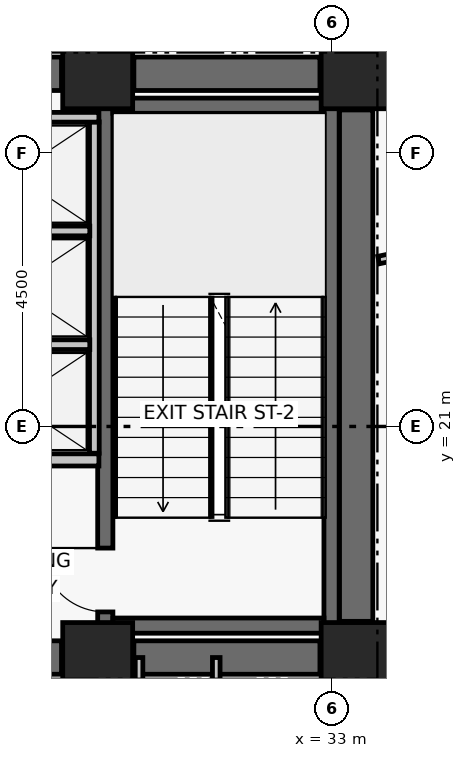
"""IFC4 building model, lengths in metres.
Left out: names, types, materials, properties, quantities, classifications, styles, units other than length and angle.
Written with IfcOpenShell. Run it as: python <this file> out.ifc"""

import sys

from ifc_helpers import new_model, si_unit, direction, frame, frame_2d, origin, origin_2d, place, context, subcontext, project, spatial, rectangle, extrude, element, fill, save


model = new_model("IFC4")
c1 = context("Model", 3, precision=1e-05, world=origin(), true_north=direction((0.0, 1.0)))
c2 = subcontext(c1, "Body", "Model", "MODEL_VIEW")
j1 = project(units=[si_unit("LENGTHUNIT", "METRE"), si_unit("PLANEANGLEUNIT", "RADIAN")], contexts=[c1])
p1 = place(None, origin())
s1 = spatial("IfcSite", under=j1, at=p1, CompositionType="ELEMENT")
p2 = place(p1, origin())
s2 = spatial("IfcBuilding", under=s1, at=p2, CompositionType="ELEMENT")
p3 = place(p2, frame((0.0, 0.0, 122.58)))
s3 = spatial("IfcBuildingStorey", under=s2, at=p3, CompositionType="ELEMENT", Elevation=122.58)
for number, where, z_axis, x_axis in (
    (1, (29.15, 17.2, 0.0), (0.0, 0.0, 1.0), (1.0, 0.0, 0.0)),
    (2, (33.4, 17.2, 0.0), (0.0, 0.0, 1.0), (1.0, 0.0, 0.0)),
    (3, (29.15, 26.8, 0.0), (0.0, 0.0, 1.0), (1.0, 0.0, 0.0)),
    (4, (33.4, 26.8, 0.0), (0.0, 0.0, 1.0), (1.0, 0.0, 0.0)),
):
    element("IfcColumn", number, at=place(p3, frame(where, z_axis=z_axis, x_axis=x_axis)), inside=s3, PredefinedType="COLUMN", context=c2, shape_type="SweptSolid", body=[
        extrude(rectangle(XDim=1.15, YDim=1.15, at=origin_2d()), origin(), (0.0, 0.0, 1.0), 3.72),
    ])
p4 = place(p3, frame((26.85, 17.2, 0.0), z_axis=(0.0, 0.0, 1.0), x_axis=(1.0, 0.0, 0.0)))
e5 = element("IfcWall", 5, at=p4, inside=s3, PredefinedType="SHEAR", context=c2, shape_type="SweptSolid", body=[
    extrude(rectangle(XDim=1.705, YDim=0.55, at=frame_2d((0.853, 0.0))), origin(), (0.0, 0.0, 1.0), 3.47),
])
p5 = place(p3, frame((29.745, 17.2, 0.0), z_axis=(0.0, 0.0, 1.0), x_axis=(1.0, 0.0, 0.0)))
e6 = element("IfcWall", 6, at=p5, inside=s3, PredefinedType="SHEAR", context=c2, shape_type="SweptSolid", body=[
    extrude(rectangle(XDim=3.06, YDim=0.55, at=frame_2d((1.53, 0.0))), origin(), (0.0, 0.0, 1.0), 3.47),
])
p6 = place(p3, frame((26.85, 26.8, 0.0), z_axis=(0.0, 0.0, 1.0), x_axis=(1.0, 0.0, 0.0)))
e7 = element("IfcWall", 7, at=p6, inside=s3, PredefinedType="SHEAR", context=c2, shape_type="SweptSolid", body=[
    extrude(rectangle(XDim=1.705, YDim=0.55, at=frame_2d((0.853, 0.0))), origin(), (0.0, 0.0, 1.0), 3.47),
])
p7 = place(p3, frame((29.745, 26.8, 0.0), z_axis=(0.0, 0.0, 1.0), x_axis=(1.0, 0.0, 0.0)))
e8 = element("IfcWall", 8, at=p7, inside=s3, PredefinedType="SHEAR", context=c2, shape_type="SweptSolid", body=[
    extrude(rectangle(XDim=3.06, YDim=0.55, at=frame_2d((1.53, 0.0))), origin(), (0.0, 0.0, 1.0), 3.47),
])
p8 = place(p3, frame((33.4, 17.795, 0.0), z_axis=(0.0, 0.0, 1.0), x_axis=(0.0, 1.0, 0.0)))
e9 = element("IfcWall", 9, at=p8, inside=s3, PredefinedType="SHEAR", context=c2, shape_type="SweptSolid", body=[
    extrude(rectangle(XDim=8.41, YDim=0.55, at=frame_2d((4.205, 0.0))), origin(), (0.0, 0.0, 1.0), 3.47),
])
p9 = place(p3, frame((29.275, 17.6, 0.0), z_axis=(0.0, 0.0, 1.0), x_axis=(0.0, 1.0, 0.0)))
e10 = element("IfcWall", 10, at=p9, inside=s3, PredefinedType="SHEAR", context=c2, shape_type="SweptSolid", body=[
    extrude(rectangle(XDim=8.8, YDim=0.25, at=frame_2d((4.4, 0.0))), origin(), (0.0, 0.0, 1.0), 3.47),
])
p10 = place(p9, frame((0.35, 0.0, 0.0)))
e11 = element("IfcOpeningElement", 11, at=p10, cuts=e10, PredefinedType="OPENING", context=c2, shape_type="SweptSolid", body=[
    extrude(rectangle(XDim=1.05, YDim=2.08, at=frame_2d((0.525, 1.04))), frame((0.0, 0.135, 0.0), z_axis=(0.0, -1.0, 0.0), x_axis=(1.0, 0.0, 0.0)), (0.0, 0.0, 1.0), 0.27),
])
p11 = place(p3, frame((32.996, 17.6, 0.0), z_axis=(0.0, 0.0, 1.0), x_axis=(0.0, 1.0, 0.0)))
e12 = element("IfcWall", 12, at=p11, inside=s3, PredefinedType="SHEAR", context=c2, shape_type="SweptSolid", body=[
    extrude(rectangle(XDim=8.8, YDim=0.25, at=frame_2d((4.4, 0.0))), origin(), (0.0, 0.0, 1.0), 3.47),
])
for number, where, z_axis, x_axis in (
    (13, (29.4, 17.725, 0.0), (0.0, 0.0, 1.0), (1.0, 0.0, 0.0)),
    (14, (29.4, 26.275, 0.0), (0.0, 0.0, 1.0), (1.0, 0.0, 0.0)),
):
    element("IfcWall", number, at=place(p3, frame(where, z_axis=z_axis, x_axis=x_axis)), inside=s3, PredefinedType="SHEAR", context=c2, shape_type="SweptSolid", body=[
        extrude(rectangle(XDim=3.471, YDim=0.25, at=frame_2d((1.736, 0.0))), origin(), (0.0, 0.0, 1.0), 3.47),
    ])
p12 = place(p3, frame((26.37, 20.45, 0.0), z_axis=(0.0, 0.0, 1.0), x_axis=(1.0, 0.0, 0.0)))
e15 = element("IfcWall", 15, at=p12, inside=s3, PredefinedType="PARTITIONING", context=c2, shape_type="SweptSolid", body=[
    extrude(rectangle(XDim=2.8, YDim=0.2, at=frame_2d((1.4, 0.0))), origin(), (0.0, 0.0, 1.0), 3.47),
])
p13 = place(p12, frame((0.78, 0.0, 0.0)))
e16 = element("IfcOpeningElement", 16, at=p13, cuts=e15, PredefinedType="OPENING", context=c2, shape_type="SweptSolid", body=[
    extrude(rectangle(XDim=1.1, YDim=2.08, at=frame_2d((0.55, 1.04))), frame((0.0, 0.11, 0.0), z_axis=(0.0, -1.0, 0.0), x_axis=(1.0, 0.0, 0.0)), (0.0, 0.0, 1.0), 0.22),
])
p14 = place(p3, frame((29.095, 20.56, 0.0), z_axis=(0.0, 0.0, 1.0), x_axis=(0.0, 1.0, 0.0)))
e17 = element("IfcWall", 17, at=p14, inside=s3, PredefinedType="PARTITIONING", context=c2, shape_type="SweptSolid", body=[
    extrude(rectangle(XDim=5.45, YDim=0.16, at=frame_2d((2.725, 0.0))), origin(), (0.0, 0.0, 1.0), 3.47),
])
p15 = place(p3, frame((26.37, 22.345, 0.0), z_axis=(0.0, 0.0, 1.0), x_axis=(1.0, 0.0, 0.0)))
e18 = element("IfcWall", 18, at=p15, inside=s3, PredefinedType="PARTITIONING", context=c2, shape_type="SweptSolid", body=[
    extrude(rectangle(XDim=2.65, YDim=0.16, at=frame_2d((1.325, 0.0))), origin(), (0.0, 0.0, 1.0), 3.47),
])
p16 = place(p3, frame((26.53, 24.215, 0.0), z_axis=(0.0, 0.0, 1.0), x_axis=(1.0, 0.0, 0.0)))
e19 = element("IfcWall", 19, at=p16, inside=s3, PredefinedType="PARTITIONING", context=c2, shape_type="SweptSolid", body=[
    extrude(rectangle(XDim=2.49, YDim=0.16, at=frame_2d((1.245, 0.0))), origin(), (0.0, 0.0, 1.0), 3.47),
])
p17 = place(p3, frame((26.34, 26.085, 0.0), z_axis=(0.0, 0.0, 1.0), x_axis=(1.0, 0.0, 0.0)))
e20 = element("IfcWall", 20, at=p17, inside=s3, PredefinedType="PARTITIONING", context=c2, shape_type="SweptSolid", body=[
    extrude(rectangle(XDim=2.83, YDim=0.16, at=frame_2d((1.415, 0.0))), origin(), (0.0, 0.0, 1.0), 3.47),
])
for number, where, z_axis, x_axis in (
    (21, (29.83, 14.95, 0.0), (0.0, 0.0, 1.0), (0.0, 1.0, 0.0)),
    (22, (31.1, 14.95, 0.0), (0.0, 0.0, 1.0), (0.0, 1.0, 0.0)),
):
    element("IfcWall", number, at=place(p3, frame(where, z_axis=z_axis, x_axis=x_axis)), inside=s3, PredefinedType="PARTITIONING", context=c2, shape_type="SweptSolid", body=[
        extrude(rectangle(XDim=2.25, YDim=0.125, at=frame_2d((1.125, 0.0))), origin(), (0.0, 0.0, 1.0), 2.6),
    ])
p18 = place(p3, frame((33.74, 27.22, 0.0), z_axis=(0.0, 0.0, 1.0), x_axis=(-1.0, 0.0, 0.0)))
e23 = element("IfcWall", 23, at=p18, inside=s3, PredefinedType="PARTITIONING", context=c2, shape_type="SweptSolid", body=[
    extrude(rectangle(XDim=0.86, YDim=0.145, at=frame_2d((0.43, 0.0))), origin(), (0.0, 0.0, 1.0), 2.6),
])
p19 = place(p3, frame((33.77, 23.737, 0.0), z_axis=(0.0, 0.0, 1.0), x_axis=(0.978144206175, 0.20792766032, 0.0)))
e24 = element("IfcWall", 24, at=p19, inside=s3, PredefinedType="PARTITIONING", context=c2, shape_type="SweptSolid", body=[
    extrude(rectangle(XDim=6.102, YDim=0.125, at=frame_2d((3.051, 0.0))), origin(), (0.0, 0.0, 1.0), 2.6),
])
p20 = place(p10, origin())
e25 = element("IfcDoor", 25, at=p20, inside=s3, OperationType="SINGLE_SWING_RIGHT", PredefinedType="DOOR", context=c2, shape_type="SweptSolid", body=[
    extrude(rectangle(XDim=1.05, YDim=2.08, at=frame_2d((0.525, 1.04))), frame((0.0, 0.025, 0.0), z_axis=(0.0, -1.0, 0.0), x_axis=(1.0, 0.0, 0.0)), (0.0, 0.0, 1.0), 0.05),
])
fill(e11, e25)
save(model, sys.argv[1])
